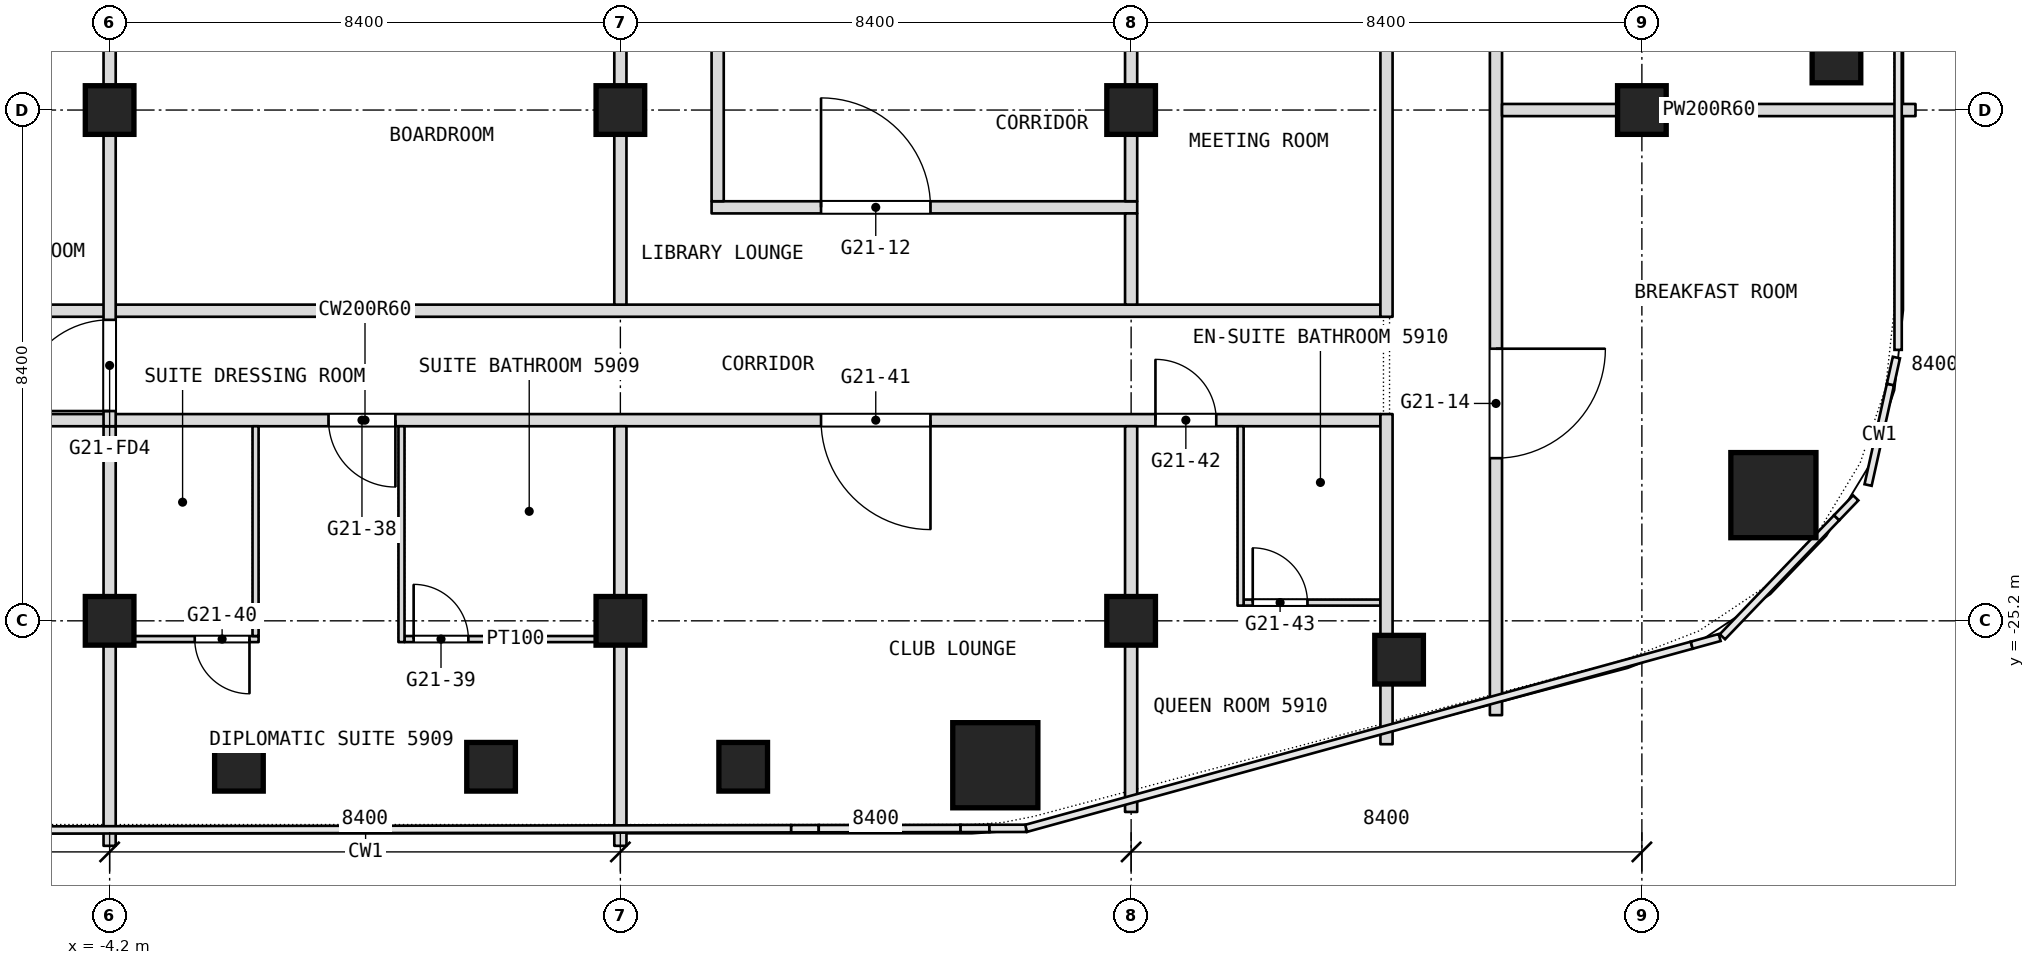
"""IFC4 building model, lengths in metres.
Left out: names, types, materials, properties, quantities, classifications, styles, units other than length and angle.
Written with IfcOpenShell. Run it as: python <this file> out.ifc"""

import sys

from ifc_helpers import new_model, si_unit, direction, frame, frame_2d, origin, origin_2d, place, context, subcontext, project, spatial, rectangle, extrude, element, fill, save


model = new_model("IFC4")
c1 = context("Model", 3, precision=1e-05, world=origin(), true_north=direction((0.0, 1.0)))
c2 = subcontext(c1, "Body", "Model", "MODEL_VIEW")
j1 = project(units=[si_unit("LENGTHUNIT", "METRE"), si_unit("PLANEANGLEUNIT", "RADIAN")], contexts=[c1])
p1 = place(None, origin())
s1 = spatial("IfcSite", under=j1, at=p1, CompositionType="ELEMENT")
p2 = place(p1, origin())
s2 = spatial("IfcBuilding", under=s1, at=p2, CompositionType="ELEMENT")
p3 = place(p2, frame((0.0, 0.0, 248.9)))
s3 = spatial("IfcBuildingStorey", under=s2, at=p3, CompositionType="ELEMENT", Elevation=248.9)
for number, where, z_axis, x_axis in (
    (1, (10.366, -27.575, 0.0), (0.0, 0.0, 1.0), (1.0, 0.0, 0.0)),
    (2, (23.163, -23.133, 0.0), (0.0, 0.0, 1.0), (1.0, 0.0, 0.0)),
):
    element("IfcColumn", number, at=place(p3, frame(where, z_axis=z_axis, x_axis=x_axis)), inside=s3, PredefinedType="COLUMN", context=c2, shape_type="SweptSolid", body=[
        extrude(rectangle(XDim=1.4, YDim=1.4, at=origin_2d()), origin(), (0.0, 0.0, 1.0), 3.6),
    ])
for number, where, z_axis, x_axis in (
    (3, (-4.2, -25.2, 0.0), (0.0, 0.0, 1.0), (1.0, 0.0, 0.0)),
    (4, (-4.2, -16.8, 0.0), (0.0, 0.0, 1.0), (1.0, 0.0, 0.0)),
    (5, (4.2, -25.2, 0.0), (0.0, 0.0, 1.0), (1.0, 0.0, 0.0)),
    (6, (4.2, -16.8, 0.0), (0.0, 0.0, 1.0), (1.0, 0.0, 0.0)),
    (7, (12.6, -25.2, 0.0), (0.0, 0.0, 1.0), (1.0, 0.0, 0.0)),
    (8, (12.6, -16.8, 0.0), (0.0, 0.0, 1.0), (1.0, 0.0, 0.0)),
    (9, (21.0, -16.8, 0.0), (0.0, 0.0, 1.0), (1.0, 0.0, 0.0)),
    (10, (24.2, -15.952, 0.0), (0.0, 0.0, 1.0), (1.0, 0.0, 0.0)),
    (11, (17.007, -25.839, 0.0), (0.0, 0.0, 1.0), (1.0, 0.0, 0.0)),
    (12, (6.22, -27.6, 0.0), (0.0, 0.0, 1.0), (1.0, 0.0, 0.0)),
    (13, (2.073, -27.6, 0.0), (0.0, 0.0, 1.0), (1.0, 0.0, 0.0)),
    (14, (-2.073, -27.6, 0.0), (0.0, 0.0, 1.0), (1.0, 0.0, 0.0)),
):
    element("IfcColumn", number, at=place(p3, frame(where, z_axis=z_axis, x_axis=x_axis)), inside=s3, PredefinedType="COLUMN", context=c2, shape_type="SweptSolid", body=[
        extrude(rectangle(XDim=0.8, YDim=0.8, at=origin_2d()), origin(), (0.0, 0.0, 1.0), 3.6),
    ])
p4 = place(p3, frame((-4.1, -25.5, 0.0), z_axis=(0.0, 0.0, 1.0), x_axis=(1.0, 0.0, 0.0)))
e15 = element("IfcWall", 15, at=p4, inside=s3, PredefinedType="PARTITIONING", context=c2, shape_type="SweptSolid", body=[
    extrude(rectangle(XDim=2.35, YDim=0.1, at=frame_2d((1.175, 0.0))), origin(), (0.0, 0.0, 1.0), 3.3),
])
p5 = place(p4, frame((1.3, 0.0, 0.0)))
e16 = element("IfcOpeningElement", 16, at=p5, cuts=e15, PredefinedType="OPENING", context=c2, shape_type="SweptSolid", body=[
    extrude(rectangle(XDim=0.9, YDim=2.1, at=frame_2d((0.45, 1.05))), frame((0.0, 0.05, 0.0), z_axis=(0.0, -1.0, 0.0), x_axis=(1.0, 0.0, 0.0)), (0.0, 0.0, 1.0), 0.1),
])
p6 = place(p3, frame((0.65, -25.5, 0.0), z_axis=(0.0, 0.0, 1.0), x_axis=(1.0, 0.0, 0.0)))
e17 = element("IfcWall", 17, at=p6, inside=s3, PredefinedType="PARTITIONING", context=c2, shape_type="SweptSolid", body=[
    extrude(rectangle(XDim=3.65, YDim=0.1, at=frame_2d((1.825, 0.0))), origin(), (0.0, 0.0, 1.0), 3.3),
])
p7 = place(p6, frame((0.15, 0.0, 0.0)))
e18 = element("IfcOpeningElement", 18, at=p7, cuts=e17, PredefinedType="OPENING", context=c2, shape_type="SweptSolid", body=[
    extrude(rectangle(XDim=0.9, YDim=2.1, at=frame_2d((0.45, 1.05))), frame((0.0, 0.05, 0.0), z_axis=(0.0, -1.0, 0.0), x_axis=(1.0, 0.0, 0.0)), (0.0, 0.0, 1.0), 0.1),
])
p8 = place(p3, frame((14.45, -24.9, 0.0), z_axis=(0.0, 0.0, 1.0), x_axis=(1.0, 0.0, 0.0)))
e19 = element("IfcWall", 19, at=p8, inside=s3, PredefinedType="PARTITIONING", context=c2, shape_type="SweptSolid", body=[
    extrude(rectangle(XDim=2.25, YDim=0.1, at=frame_2d((1.125, 0.0))), origin(), (0.0, 0.0, 1.0), 3.3),
])
p9 = place(p8, frame((0.15, 0.0, 0.0)))
e20 = element("IfcOpeningElement", 20, at=p9, cuts=e19, PredefinedType="OPENING", context=c2, shape_type="SweptSolid", body=[
    extrude(rectangle(XDim=0.9, YDim=2.1, at=frame_2d((0.45, 1.05))), frame((0.0, 0.05, 0.0), z_axis=(0.0, -1.0, 0.0), x_axis=(1.0, 0.0, 0.0)), (0.0, 0.0, 1.0), 0.1),
])
p10 = place(p3, frame((-16.7, -21.9, 0.0), z_axis=(0.0, 0.0, 1.0), x_axis=(1.0, 0.0, 0.0)))
e21 = element("IfcWall", 21, at=p10, inside=s3, PredefinedType="PARTITIONING", context=c2, shape_type="SweptSolid", body=[
    extrude(rectangle(XDim=33.4, YDim=0.2, at=frame_2d((16.7, 0.0))), origin(), (0.0, 0.0, 1.0), 3.3),
])
p11 = place(p10, frame((0.3, 0.0, 0.0)))
e22 = element("IfcOpeningElement", 22, at=p11, cuts=e21, PredefinedType="OPENING", context=c2, shape_type="SweptSolid", body=[
    extrude(rectangle(XDim=1.0, YDim=2.1, at=frame_2d((0.5, 1.05))), frame((0.0, 0.1, 0.0), z_axis=(0.0, -1.0, 0.0), x_axis=(1.0, 0.0, 0.0)), (0.0, 0.0, 1.0), 0.2),
])
p12 = place(p10, frame((9.85, 0.0, 0.0)))
e23 = element("IfcOpeningElement", 23, at=p12, cuts=e21, PredefinedType="OPENING", context=c2, shape_type="SweptSolid", body=[
    extrude(rectangle(XDim=1.1, YDim=2.1, at=frame_2d((0.55, 1.05))), frame((0.0, 0.1, 0.0), z_axis=(0.0, -1.0, 0.0), x_axis=(1.0, 0.0, 0.0)), (0.0, 0.0, 1.0), 0.2),
])
p13 = place(p10, frame((16.1, 0.0, 0.0)))
e24 = element("IfcOpeningElement", 24, at=p13, cuts=e21, PredefinedType="OPENING", context=c2, shape_type="SweptSolid", body=[
    extrude(rectangle(XDim=1.1, YDim=2.1, at=frame_2d((0.55, 1.05))), frame((0.0, 0.1, 0.0), z_axis=(0.0, -1.0, 0.0), x_axis=(1.0, 0.0, 0.0)), (0.0, 0.0, 1.0), 0.2),
])
p14 = place(p10, frame((24.2, 0.0, 0.0)))
e25 = element("IfcOpeningElement", 25, at=p14, cuts=e21, PredefinedType="OPENING", context=c2, shape_type="SweptSolid", body=[
    extrude(rectangle(XDim=1.8, YDim=2.1, at=frame_2d((0.9, 1.05))), frame((0.0, 0.1, 0.0), z_axis=(0.0, -1.0, 0.0), x_axis=(1.0, 0.0, 0.0)), (0.0, 0.0, 1.0), 0.2),
])
p15 = place(p10, frame((29.7, 0.0, 0.0)))
e26 = element("IfcOpeningElement", 26, at=p15, cuts=e21, PredefinedType="OPENING", context=c2, shape_type="SweptSolid", body=[
    extrude(rectangle(XDim=1.0, YDim=2.1, at=frame_2d((0.5, 1.05))), frame((0.0, 0.1, 0.0), z_axis=(0.0, -1.0, 0.0), x_axis=(1.0, 0.0, 0.0)), (0.0, 0.0, 1.0), 0.2),
])
p16 = place(p3, frame((-16.7, -20.1, 0.0), z_axis=(0.0, 0.0, 1.0), x_axis=(1.0, 0.0, 0.0)))
e27 = element("IfcWall", 27, at=p16, inside=s3, PredefinedType="PARTITIONING", context=c2, shape_type="SweptSolid", body=[
    extrude(rectangle(XDim=33.4, YDim=0.2, at=frame_2d((16.7, 0.0))), origin(), (0.0, 0.0, 1.0), 3.3),
])
p17 = place(p3, frame((18.6, -26.751, 0.0), z_axis=(0.0, 0.0, 1.0), x_axis=(0.0, 1.0, 0.0)))
e28 = element("IfcWall", 28, at=p17, inside=s3, PredefinedType="PARTITIONING", context=c2, shape_type="SweptSolid", body=[
    extrude(rectangle(XDim=49.091, YDim=0.2, at=frame_2d((24.545, 0.0))), origin(), (0.0, 0.0, 1.0), 3.3),
])
p18 = place(p17, frame((4.226, 0.0, 0.0)))
e29 = element("IfcOpeningElement", 29, at=p18, cuts=e28, PredefinedType="OPENING", context=c2, shape_type="SweptSolid", body=[
    extrude(rectangle(XDim=1.8, YDim=2.1, at=frame_2d((0.9, 1.05))), frame((0.0, 0.1, 0.0), z_axis=(0.0, -1.0, 0.0), x_axis=(1.0, 0.0, 0.0)), (0.0, 0.0, 1.0), 0.2),
])
p19 = place(p17, frame((13.251, 0.0, 0.0)))
e30 = element("IfcOpeningElement", 30, at=p19, cuts=e28, PredefinedType="OPENING", context=c2, shape_type="SweptSolid", body=[
    extrude(rectangle(XDim=1.8, YDim=2.1, at=frame_2d((0.9, 1.05))), frame((0.0, 0.1, 0.0), z_axis=(0.0, -1.0, 0.0), x_axis=(1.0, 0.0, 0.0)), (0.0, 0.0, 1.0), 0.2),
])
p20 = place(p17, frame((21.151, 0.0, 0.0)))
e31 = element("IfcOpeningElement", 31, at=p20, cuts=e28, PredefinedType="OPENING", context=c2, shape_type="SweptSolid", body=[
    extrude(rectangle(XDim=1.0, YDim=2.1, at=frame_2d((0.5, 1.05))), frame((0.0, 0.1, 0.0), z_axis=(0.0, -1.0, 0.0), x_axis=(1.0, 0.0, 0.0)), (0.0, 0.0, 1.0), 0.2),
])
p21 = place(p17, frame((22.951, 0.0, 0.0)))
e32 = element("IfcOpeningElement", 32, at=p21, cuts=e28, PredefinedType="OPENING", context=c2, shape_type="SweptSolid", body=[
    extrude(rectangle(XDim=1.0, YDim=2.1, at=frame_2d((0.5, 1.05))), frame((0.0, 0.1, 0.0), z_axis=(0.0, -1.0, 0.0), x_axis=(1.0, 0.0, 0.0)), (0.0, 0.0, 1.0), 0.2),
])
p22 = place(p17, frame((27.151, 0.0, 0.0)))
e33 = element("IfcOpeningElement", 33, at=p22, cuts=e28, PredefinedType="OPENING", context=c2, shape_type="SweptSolid", body=[
    extrude(rectangle(XDim=1.0, YDim=2.1, at=frame_2d((0.5, 1.05))), frame((0.0, 0.1, 0.0), z_axis=(0.0, -1.0, 0.0), x_axis=(1.0, 0.0, 0.0)), (0.0, 0.0, 1.0), 0.2),
])
p23 = place(p17, frame((33.751, 0.0, 0.0)))
e34 = element("IfcOpeningElement", 34, at=p23, cuts=e28, PredefinedType="OPENING", context=c2, shape_type="SweptSolid", body=[
    extrude(rectangle(XDim=1.0, YDim=2.1, at=frame_2d((0.5, 1.05))), frame((0.0, 0.1, 0.0), z_axis=(0.0, -1.0, 0.0), x_axis=(1.0, 0.0, 0.0)), (0.0, 0.0, 1.0), 0.2),
])
p24 = place(p17, frame((38.851, 0.0, 0.0)))
e35 = element("IfcOpeningElement", 35, at=p24, cuts=e28, PredefinedType="OPENING", context=c2, shape_type="SweptSolid", body=[
    extrude(rectangle(XDim=1.1, YDim=2.1, at=frame_2d((0.55, 1.05))), frame((0.0, 0.1, 0.0), z_axis=(0.0, -1.0, 0.0), x_axis=(1.0, 0.0, 0.0)), (0.0, 0.0, 1.0), 0.2),
])
p25 = place(p17, frame((44.051, 0.0, 0.0)))
e36 = element("IfcOpeningElement", 36, at=p25, cuts=e28, PredefinedType="OPENING", context=c2, shape_type="SweptSolid", body=[
    extrude(rectangle(XDim=1.0, YDim=2.1, at=frame_2d((0.5, 1.05))), frame((0.0, 0.1, 0.0), z_axis=(0.0, -1.0, 0.0), x_axis=(1.0, 0.0, 0.0)), (0.0, 0.0, 1.0), 0.2),
])
p26 = place(p3, frame((5.7, -18.4, 0.0), z_axis=(0.0, 0.0, 1.0), x_axis=(1.0, 0.0, 0.0)))
e37 = element("IfcWall", 37, at=p26, inside=s3, PredefinedType="PARTITIONING", context=c2, shape_type="SweptSolid", body=[
    extrude(rectangle(XDim=7.0, YDim=0.2, at=frame_2d((3.5, 0.0))), origin(), (0.0, 0.0, 1.0), 3.3),
])
p27 = place(p26, frame((1.8, 0.0, 0.0)))
e38 = element("IfcOpeningElement", 38, at=p27, cuts=e37, PredefinedType="OPENING", context=c2, shape_type="SweptSolid", body=[
    extrude(rectangle(XDim=1.8, YDim=2.1, at=frame_2d((0.9, 1.05))), frame((0.0, 0.1, 0.0), z_axis=(0.0, -1.0, 0.0), x_axis=(1.0, 0.0, 0.0)), (0.0, 0.0, 1.0), 0.2),
])
p28 = place(p3, frame((16.8, -27.229, 0.0), z_axis=(0.0, 0.0, 1.0), x_axis=(0.0, 1.0, 0.0)))
e39 = element("IfcWall", 39, at=p28, inside=s3, PredefinedType="PARTITIONING", context=c2, shape_type="SweptSolid", body=[
    extrude(rectangle(XDim=5.429, YDim=0.2, at=frame_2d((2.714, 0.0))), origin(), (0.0, 0.0, 1.0), 3.3),
])
p29 = place(p3, frame((16.8, -20.2, 0.0), z_axis=(0.0, 0.0, 1.0), x_axis=(0.0, 1.0, 0.0)))
e40 = element("IfcWall", 40, at=p29, inside=s3, PredefinedType="PARTITIONING", context=c2, shape_type="SweptSolid", body=[
    extrude(rectangle(XDim=6.8, YDim=0.2, at=frame_2d((3.4, 0.0))), origin(), (0.0, 0.0, 1.0), 3.3),
])
p30 = place(p3, frame((18.7, -16.8, 0.0), z_axis=(0.0, 0.0, 1.0), x_axis=(1.0, 0.0, 0.0)))
e41 = element("IfcWall", 41, at=p30, inside=s3, PredefinedType="PARTITIONING", context=c2, shape_type="SweptSolid", body=[
    extrude(rectangle(XDim=6.8, YDim=0.2, at=frame_2d((3.4, 0.0))), origin(), (0.0, 0.0, 1.0), 2.9),
])
p31 = place(p3, frame((14.4, -24.95, 0.0), z_axis=(0.0, 0.0, 1.0), x_axis=(0.0, 1.0, 0.0)))
e42 = element("IfcWall", 42, at=p31, inside=s3, PredefinedType="PARTITIONING", context=c2, shape_type="SweptSolid", body=[
    extrude(rectangle(XDim=2.95, YDim=0.1, at=frame_2d((1.475, 0.0))), origin(), (0.0, 0.0, 1.0), 3.3),
])
p32 = place(p3, frame((12.6, -28.343, 0.0), z_axis=(0.0, 0.0, 1.0), x_axis=(0.0, 1.0, 0.0)))
e43 = element("IfcWall", 43, at=p32, inside=s3, PredefinedType="PARTITIONING", context=c2, shape_type="SweptSolid", body=[
    extrude(rectangle(XDim=6.343, YDim=0.2, at=frame_2d((3.171, 0.0))), origin(), (0.0, 0.0, 1.0), 2.486),
])
p33 = place(p3, frame((12.6, -20.0, 0.0), z_axis=(0.0, 0.0, 1.0), x_axis=(0.0, 1.0, 0.0)))
e44 = element("IfcWall", 44, at=p33, inside=s3, PredefinedType="PARTITIONING", context=c2, shape_type="SweptSolid", body=[
    extrude(rectangle(XDim=1.5, YDim=0.2, at=frame_2d((0.75, 0.0))), origin(), (0.0, 0.0, 1.0), 2.486),
])
p34 = place(p3, frame((12.6, -18.3, 0.0), z_axis=(0.0, 0.0, 1.0), x_axis=(0.0, 1.0, 0.0)))
e45 = element("IfcWall", 45, at=p34, inside=s3, PredefinedType="PARTITIONING", context=c2, shape_type="SweptSolid", body=[
    extrude(rectangle(XDim=4.7, YDim=0.2, at=frame_2d((2.35, 0.0))), origin(), (0.0, 0.0, 1.0), 2.486),
])
p35 = place(p3, frame((5.8, -18.3, 0.0), z_axis=(0.0, 0.0, 1.0), x_axis=(0.0, 1.0, 0.0)))
e46 = element("IfcWall", 46, at=p35, inside=s3, PredefinedType="PARTITIONING", context=c2, shape_type="SweptSolid", body=[
    extrude(rectangle(XDim=4.9, YDim=0.2, at=frame_2d((2.45, 0.0))), origin(), (0.0, 0.0, 1.0), 3.3),
])
p36 = place(p3, frame((4.2, -28.9, 0.0), z_axis=(0.0, 0.0, 1.0), x_axis=(0.0, 1.0, 0.0)))
e47 = element("IfcWall", 47, at=p36, inside=s3, PredefinedType="PARTITIONING", context=c2, shape_type="SweptSolid", body=[
    extrude(rectangle(XDim=6.9, YDim=0.2, at=frame_2d((3.45, 0.0))), origin(), (0.0, 0.0, 1.0), 2.486),
])
p37 = place(p3, frame((4.2, -20.0, 0.0), z_axis=(0.0, 0.0, 1.0), x_axis=(0.0, 1.0, 0.0)))
e48 = element("IfcWall", 48, at=p37, inside=s3, PredefinedType="PARTITIONING", context=c2, shape_type="SweptSolid", body=[
    extrude(rectangle(XDim=6.4, YDim=0.2, at=frame_2d((3.2, 0.0))), origin(), (0.0, 0.0, 1.0), 2.486),
])
p38 = place(p3, frame((0.6, -25.55, 0.0), z_axis=(0.0, 0.0, 1.0), x_axis=(0.0, 1.0, 0.0)))
e49 = element("IfcWall", 49, at=p38, inside=s3, PredefinedType="PARTITIONING", context=c2, shape_type="SweptSolid", body=[
    extrude(rectangle(XDim=3.55, YDim=0.1, at=frame_2d((1.775, 0.0))), origin(), (0.0, 0.0, 1.0), 3.3),
])
p39 = place(p3, frame((-1.8, -25.45, 0.0), z_axis=(0.0, 0.0, 1.0), x_axis=(0.0, 1.0, 0.0)))
e50 = element("IfcWall", 50, at=p39, inside=s3, PredefinedType="PARTITIONING", context=c2, shape_type="SweptSolid", body=[
    extrude(rectangle(XDim=3.45, YDim=0.1, at=frame_2d((1.725, 0.0))), origin(), (0.0, 0.0, 1.0), 3.3),
])
p40 = place(p3, frame((-4.2, -28.9, 0.0), z_axis=(0.0, 0.0, 1.0), x_axis=(0.0, 1.0, 0.0)))
e51 = element("IfcWall", 51, at=p40, inside=s3, PredefinedType="PARTITIONING", context=c2, shape_type="SweptSolid", body=[
    extrude(rectangle(XDim=6.9, YDim=0.2, at=frame_2d((3.45, 0.0))), origin(), (0.0, 0.0, 1.0), 2.486),
])
p41 = place(p3, frame((-4.2, -22.0, 0.0), z_axis=(0.0, 0.0, 1.0), x_axis=(0.0, 1.0, 0.0)))
e52 = element("IfcWall", 52, at=p41, inside=s3, PredefinedType="PARTITIONING", context=c2, shape_type="SweptSolid", body=[
    extrude(rectangle(XDim=8.4, YDim=0.2, at=frame_2d((4.2, 0.0))), origin(), (0.0, 0.0, 1.0), 2.486),
])
p42 = place(p41, frame((0.25, 0.0, 0.0)))
e53 = element("IfcOpeningElement", 53, at=p42, cuts=e52, PredefinedType="OPENING", context=c2, shape_type="SweptSolid", body=[
    extrude(rectangle(XDim=1.5, YDim=2.1, at=frame_2d((0.75, 1.05))), frame((0.0, 0.1, 0.0), z_axis=(0.0, -1.0, 0.0), x_axis=(1.0, 0.0, 0.0)), (0.0, 0.0, 1.0), 0.2),
])
p43 = place(p5, origin())
e54 = element("IfcDoor", 54, at=p43, inside=s3, OperationType="SINGLE_SWING_RIGHT", PredefinedType="DOOR", context=c2, shape_type="SweptSolid", body=[
    extrude(rectangle(XDim=0.9, YDim=2.1, at=frame_2d((0.45, 1.05))), frame((0.0, 0.025, 0.0), z_axis=(0.0, -1.0, 0.0), x_axis=(1.0, 0.0, 0.0)), (0.0, 0.0, 1.0), 0.05),
])
fill(e16, e54)
p44 = place(p7, origin())
e55 = element("IfcDoor", 55, at=p44, inside=s3, OperationType="SINGLE_SWING_LEFT", PredefinedType="DOOR", context=c2, shape_type="SweptSolid", body=[
    extrude(rectangle(XDim=0.9, YDim=2.1, at=frame_2d((0.45, 1.05))), frame((0.0, 0.025, 0.0), z_axis=(0.0, -1.0, 0.0), x_axis=(1.0, 0.0, 0.0)), (0.0, 0.0, 1.0), 0.05),
])
fill(e18, e55)
p45 = place(p9, origin())
e56 = element("IfcDoor", 56, at=p45, inside=s3, OperationType="SINGLE_SWING_LEFT", PredefinedType="DOOR", context=c2, shape_type="SweptSolid", body=[
    extrude(rectangle(XDim=0.9, YDim=2.1, at=frame_2d((0.45, 1.05))), frame((0.0, 0.025, 0.0), z_axis=(0.0, -1.0, 0.0), x_axis=(1.0, 0.0, 0.0)), (0.0, 0.0, 1.0), 0.05),
])
fill(e20, e56)
p46 = place(p13, origin())
e57 = element("IfcDoor", 57, at=p46, inside=s3, OperationType="SINGLE_SWING_LEFT", PredefinedType="DOOR", context=c2, shape_type="SweptSolid", body=[
    extrude(rectangle(XDim=1.1, YDim=2.1, at=frame_2d((0.55, 1.05))), frame((0.0, 0.025, 0.0), z_axis=(0.0, -1.0, 0.0), x_axis=(1.0, 0.0, 0.0)), (0.0, 0.0, 1.0), 0.05),
])
fill(e24, e57)
p47 = place(p14, origin())
e58 = element("IfcDoor", 58, at=p47, inside=s3, OperationType="DOUBLE_DOOR_SINGLE_SWING", PredefinedType="DOOR", context=c2, shape_type="SweptSolid", body=[
    extrude(rectangle(XDim=1.8, YDim=2.1, at=frame_2d((0.9, 1.05))), frame((0.0, 0.025, 0.0), z_axis=(0.0, -1.0, 0.0), x_axis=(1.0, 0.0, 0.0)), (0.0, 0.0, 1.0), 0.05),
])
fill(e25, e58)
p48 = place(p15, origin())
e59 = element("IfcDoor", 59, at=p48, inside=s3, OperationType="SINGLE_SWING_RIGHT", PredefinedType="DOOR", context=c2, shape_type="SweptSolid", body=[
    extrude(rectangle(XDim=1.0, YDim=2.1, at=frame_2d((0.5, 1.05))), frame((0.0, 0.025, 0.0), z_axis=(0.0, -1.0, 0.0), x_axis=(1.0, 0.0, 0.0)), (0.0, 0.0, 1.0), 0.05),
])
fill(e26, e59)
p49 = place(p18, origin())
e60 = element("IfcDoor", 60, at=p49, inside=s3, OperationType="DOUBLE_DOOR_SINGLE_SWING", PredefinedType="DOOR", context=c2, shape_type="SweptSolid", body=[
    extrude(rectangle(XDim=1.8, YDim=2.1, at=frame_2d((0.9, 1.05))), frame((0.0, 0.025, 0.0), z_axis=(0.0, -1.0, 0.0), x_axis=(1.0, 0.0, 0.0)), (0.0, 0.0, 1.0), 0.05),
])
fill(e29, e60)
p50 = place(p27, origin())
e61 = element("IfcDoor", 61, at=p50, inside=s3, OperationType="DOUBLE_DOOR_SINGLE_SWING", PredefinedType="DOOR", context=c2, shape_type="SweptSolid", body=[
    extrude(rectangle(XDim=1.8, YDim=2.1, at=frame_2d((0.9, 1.05))), frame((0.0, 0.025, 0.0), z_axis=(0.0, -1.0, 0.0), x_axis=(1.0, 0.0, 0.0)), (0.0, 0.0, 1.0), 0.05),
])
fill(e38, e61)
p51 = place(p42, origin())
e62 = element("IfcDoor", 62, at=p51, inside=s3, OperationType="DOUBLE_DOOR_DOUBLE_SWING", PredefinedType="DOOR", context=c2, shape_type="SweptSolid", body=[
    extrude(rectangle(XDim=1.5, YDim=2.1, at=frame_2d((0.75, 1.05))), frame((0.0, 0.025, 0.0), z_axis=(0.0, -1.0, 0.0), x_axis=(1.0, 0.0, 0.0)), (0.0, 0.0, 1.0), 0.05),
])
fill(e53, e62)
save(model, sys.argv[1])
